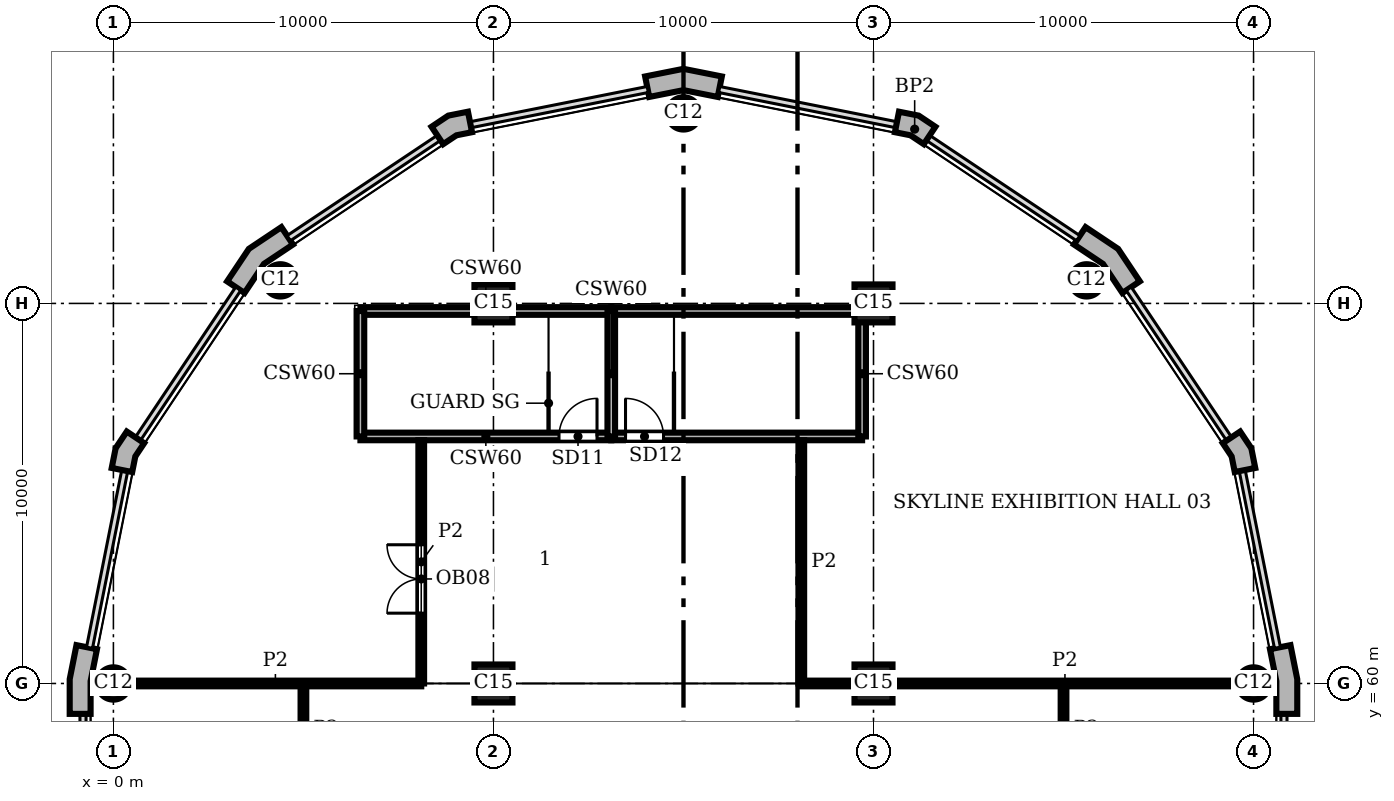
"""IFC4 building model, lengths in metres.
Left out: names, types, materials, properties, quantities, classifications, styles, units other than length and angle.
Written with IfcOpenShell. Run it as: python <this file> out.ifc"""

import sys

from ifc_helpers import new_model, si_unit, direction, frame, frame_2d, origin, origin_2d, place, context, subcontext, project, spatial, polyline, rectangle, circle, outline, extrude, element, fill, save


model = new_model("IFC4")
c1 = context("Model", 3, precision=1e-05, world=origin(), true_north=direction((0.0, 1.0)))
c2 = subcontext(c1, "Body", "Model", "MODEL_VIEW")
j1 = project(units=[si_unit("LENGTHUNIT", "METRE"), si_unit("PLANEANGLEUNIT", "RADIAN")], contexts=[c1])
p1 = place(None, origin())
s1 = spatial("IfcSite", under=j1, at=p1, CompositionType="ELEMENT")
p2 = place(p1, origin())
s2 = spatial("IfcBuilding", under=s1, at=p2, CompositionType="ELEMENT")
p3 = place(p2, frame((0.0, 0.0, 358.2)))
s3 = spatial("IfcBuildingStorey", under=s2, at=p3, CompositionType="ELEMENT", Elevation=358.2)
for number, where, z_axis, x_axis in (
    (1, (30.0, 60.0, 0.0), (0.0, 0.0, 1.0), (1.0, 0.0, 0.0)),
    (2, (25.607, 70.607, 0.0), (0.0, 0.0, 1.0), (1.0, 0.0, 0.0)),
    (3, (15.0, 75.0, 0.0), (0.0, 0.0, 1.0), (1.0, 0.0, 0.0)),
    (4, (4.393, 70.607, 0.0), (0.0, 0.0, 1.0), (1.0, 0.0, 0.0)),
    (5, (0.0, 60.0, 0.0), (0.0, 0.0, 1.0), (1.0, 0.0, 0.0)),
):
    element("IfcColumn", number, at=place(p3, frame(where, z_axis=z_axis, x_axis=x_axis)), inside=s3, PredefinedType="COLUMN", context=c2, shape_type="SweptSolid", body=[
        extrude(circle(Radius=0.425, at=origin_2d()), origin(), (0.0, 0.0, 1.0), 7.2),
    ])
for number, where, z_axis, x_axis in (
    (6, (10.0, 60.0, 0.0), (0.0, 0.0, 1.0), (1.0, 0.0, 0.0)),
    (7, (10.0, 70.0, 0.0), (0.0, 0.0, 1.0), (1.0, 0.0, 0.0)),
    (8, (20.0, 60.0, 0.0), (0.0, 0.0, 1.0), (1.0, 0.0, 0.0)),
    (9, (20.0, 70.0, 0.0), (0.0, 0.0, 1.0), (1.0, 0.0, 0.0)),
):
    element("IfcColumn", number, at=place(p3, frame(where, z_axis=z_axis, x_axis=x_axis)), inside=s3, PredefinedType="COLUMN", context=c2, shape_type="SweptSolid", body=[
        extrude(rectangle(XDim=1.0, YDim=1.0, at=origin_2d()), origin(), (0.0, 0.0, 1.0), 7.2),
    ])
p4 = place(p3, origin())
e10 = element("IfcWall", 10, at=p4, inside=s3, PredefinedType="SOLIDWALL", context=c2, shape_type="SweptSolid", body=[
    extrude(outline(polyline([(31.0, 59.2), (31.15, 59.2), (31.15, 60.113), (30.972, 61.009), (30.825, 60.98), (30.432, 60.902), (30.6, 60.059), (30.6, 59.2), (31.0, 59.2)])), origin(), (0.0, 0.0, 1.0), 7.2),
])
e11 = element("IfcWall", 11, at=p4, inside=s3, PredefinedType="SOLIDWALL", context=c2, shape_type="SweptSolid", body=[
    extrude(outline(polyline([(29.897, 65.641), (30.045, 65.67), (29.941, 66.189), (29.648, 66.629), (29.523, 66.545), (29.19, 66.323), (29.423, 65.974), (29.505, 65.563), (29.897, 65.641)])), origin(), (0.0, 0.0, 1.0), 7.2),
])
e12 = element("IfcWall", 12, at=p4, inside=s3, PredefinedType="SOLIDWALL", context=c2, shape_type="SweptSolid", body=[
    extrude(outline(polyline([(26.883, 70.497), (27.007, 70.58), (26.436, 71.436), (25.58, 72.007), (25.497, 71.883), (25.275, 71.55), (26.039, 71.039), (26.55, 70.275), (26.883, 70.497)])), origin(), (0.0, 0.0, 1.0), 7.2),
])
e13 = element("IfcWall", 13, at=p4, inside=s3, PredefinedType="SOLIDWALL", context=c2, shape_type="SweptSolid", body=[
    extrude(outline(polyline([(21.545, 74.523), (21.629, 74.648), (21.189, 74.941), (20.67, 75.045), (20.641, 74.897), (20.563, 74.505), (20.974, 74.423), (21.323, 74.19), (21.545, 74.523)])), origin(), (0.0, 0.0, 1.0), 7.2),
])
e14 = element("IfcWall", 14, at=p4, inside=s3, PredefinedType="SOLIDWALL", context=c2, shape_type="SweptSolid", body=[
    extrude(outline(polyline([(15.98, 75.825), (16.009, 75.972), (15.0, 76.173), (13.991, 75.972), (14.02, 75.825), (14.098, 75.432), (15.0, 75.612), (15.902, 75.432), (15.98, 75.825)])), origin(), (0.0, 0.0, 1.0), 7.2),
])
e15 = element("IfcWall", 15, at=p4, inside=s3, PredefinedType="SOLIDWALL", context=c2, shape_type="SweptSolid", body=[
    extrude(outline(polyline([(9.359, 74.897), (9.33, 75.045), (8.811, 74.941), (8.371, 74.648), (8.455, 74.523), (8.677, 74.19), (9.026, 74.423), (9.437, 74.505), (9.359, 74.897)])), origin(), (0.0, 0.0, 1.0), 7.2),
])
e16 = element("IfcWall", 16, at=p4, inside=s3, PredefinedType="SOLIDWALL", context=c2, shape_type="SweptSolid", body=[
    extrude(outline(polyline([(4.503, 71.883), (4.42, 72.007), (3.564, 71.436), (2.993, 70.58), (3.117, 70.497), (3.45, 70.275), (3.961, 71.039), (4.725, 71.55), (4.503, 71.883)])), origin(), (0.0, 0.0, 1.0), 7.2),
])
e17 = element("IfcWall", 17, at=p4, inside=s3, PredefinedType="SOLIDWALL", context=c2, shape_type="SweptSolid", body=[
    extrude(outline(polyline([(0.477, 66.545), (0.352, 66.629), (0.059, 66.189), (-0.045, 65.67), (0.103, 65.641), (0.495, 65.563), (0.577, 65.974), (0.81, 66.323), (0.477, 66.545)])), origin(), (0.0, 0.0, 1.0), 7.2),
])
e18 = element("IfcWall", 18, at=p4, inside=s3, PredefinedType="SOLIDWALL", context=c2, shape_type="SweptSolid", body=[
    extrude(outline(polyline([(-0.825, 60.98), (-0.972, 61.009), (-1.15, 60.113), (-1.15, 59.2), (-1.0, 59.2), (-0.6, 59.2), (-0.6, 60.059), (-0.432, 60.902), (-0.825, 60.98)])), origin(), (0.0, 0.0, 1.0), 7.2),
])
p5 = place(p3, frame((6.5, 66.5, 0.0), z_axis=(0.0, 0.0, 1.0), x_axis=(1.0, 0.0, 0.0)))
e19 = element("IfcWall", 19, at=p5, inside=s3, PredefinedType="SHEAR", context=c2, shape_type="SweptSolid", body=[
    extrude(rectangle(XDim=6.6, YDim=0.2, at=frame_2d((3.3, 0.0))), origin(), (0.0, 0.0, 1.0), 6.75),
])
p6 = place(p5, frame((5.225, 0.0, 0.0)))
e20 = element("IfcOpeningElement", 20, at=p6, cuts=e19, PredefinedType="OPENING", context=c2, shape_type="SweptSolid", body=[
    extrude(rectangle(XDim=1.0, YDim=2.1, at=frame_2d((0.5, 1.05))), frame((0.0, 0.11, 0.0), z_axis=(0.0, -1.0, 0.0), x_axis=(1.0, 0.0, 0.0)), (0.0, 0.0, 1.0), 0.22),
])
p7 = place(p3, frame((13.1, 66.5, 0.0), z_axis=(0.0, 0.0, 1.0), x_axis=(1.0, 0.0, 0.0)))
e21 = element("IfcWall", 21, at=p7, inside=s3, PredefinedType="SHEAR", context=c2, shape_type="SweptSolid", body=[
    extrude(rectangle(XDim=6.6, YDim=0.2, at=frame_2d((3.3, 0.0))), origin(), (0.0, 0.0, 1.0), 6.75),
])
p8 = place(p7, frame((0.375, 0.0, 0.0)))
e22 = element("IfcOpeningElement", 22, at=p8, cuts=e21, PredefinedType="OPENING", context=c2, shape_type="SweptSolid", body=[
    extrude(rectangle(XDim=1.0, YDim=2.1, at=frame_2d((0.5, 1.05))), frame((0.0, 0.11, 0.0), z_axis=(0.0, -1.0, 0.0), x_axis=(1.0, 0.0, 0.0)), (0.0, 0.0, 1.0), 0.22),
])
p9 = place(p3, frame((6.5, 69.8, 0.0), z_axis=(0.0, 0.0, 1.0), x_axis=(1.0, 0.0, 0.0)))
e23 = element("IfcWall", 23, at=p9, inside=s3, PredefinedType="SHEAR", context=c2, shape_type="SweptSolid", body=[
    extrude(rectangle(XDim=6.6, YDim=0.2, at=frame_2d((3.3, 0.0))), origin(), (0.0, 0.0, 1.0), 6.75),
])
p10 = place(p3, frame((13.1, 69.8, 0.0), z_axis=(0.0, 0.0, 1.0), x_axis=(1.0, 0.0, 0.0)))
e24 = element("IfcWall", 24, at=p10, inside=s3, PredefinedType="SHEAR", context=c2, shape_type="SweptSolid", body=[
    extrude(rectangle(XDim=6.6, YDim=0.2, at=frame_2d((3.3, 0.0))), origin(), (0.0, 0.0, 1.0), 6.75),
])
for number, where, z_axis, x_axis in (
    (25, (6.5, 66.5, 0.0), (0.0, 0.0, 1.0), (0.0, 1.0, 0.0)),
    (26, (13.1, 66.5, 0.0), (0.0, 0.0, 1.0), (0.0, 1.0, 0.0)),
    (27, (19.7, 66.5, 0.0), (0.0, 0.0, 1.0), (0.0, 1.0, 0.0)),
):
    element("IfcWall", number, at=place(p3, frame(where, z_axis=z_axis, x_axis=x_axis)), inside=s3, PredefinedType="SHEAR", context=c2, shape_type="SweptSolid", body=[
        extrude(rectangle(XDim=3.3, YDim=0.2, at=frame_2d((1.65, 0.0))), origin(), (0.0, 0.0, 1.0), 6.75),
    ])
p11 = place(p3, frame((5.0, 57.6, 0.0), z_axis=(0.0, 0.0, 1.0), x_axis=(0.0, 1.0, 0.0)))
e28 = element("IfcWall", 28, at=p11, inside=s3, PredefinedType="PARTITIONING", context=c2, shape_type="SweptSolid", body=[
    extrude(rectangle(XDim=2.4, YDim=0.15, at=frame_2d((1.2, 0.0))), origin(), (0.0, 0.0, 1.0), 6.75),
])
p12 = place(p3, frame((8.1, 60.0, 0.0), z_axis=(0.0, 0.0, 1.0), x_axis=(0.0, 1.0, 0.0)))
e29 = element("IfcWall", 29, at=p12, inside=s3, PredefinedType="PARTITIONING", context=c2, shape_type="SweptSolid", body=[
    extrude(rectangle(XDim=6.4, YDim=0.15, at=frame_2d((3.2, 0.0))), origin(), (0.0, 0.0, 1.0), 6.75),
])
p13 = place(p12, frame((1.85, 0.0, 0.0)))
e30 = element("IfcOpeningElement", 30, at=p13, cuts=e29, PredefinedType="OPENING", context=c2, shape_type="SweptSolid", body=[
    extrude(rectangle(XDim=1.8, YDim=2.1, at=frame_2d((0.9, 1.05))), frame((0.0, 0.085, 0.0), z_axis=(0.0, -1.0, 0.0), x_axis=(1.0, 0.0, 0.0)), (0.0, 0.0, 1.0), 0.17),
])
p14 = place(p3, frame((18.1, 60.0, 0.0), z_axis=(0.0, 0.0, 1.0), x_axis=(0.0, 1.0, 0.0)))
e31 = element("IfcWall", 31, at=p14, inside=s3, PredefinedType="PARTITIONING", context=c2, shape_type="SweptSolid", body=[
    extrude(rectangle(XDim=6.4, YDim=0.15, at=frame_2d((3.2, 0.0))), origin(), (0.0, 0.0, 1.0), 6.75),
])
p15 = place(p3, frame((25.0, 57.6, 0.0), z_axis=(0.0, 0.0, 1.0), x_axis=(0.0, 1.0, 0.0)))
e32 = element("IfcWall", 32, at=p15, inside=s3, PredefinedType="PARTITIONING", context=c2, shape_type="SweptSolid", body=[
    extrude(rectangle(XDim=2.4, YDim=0.15, at=frame_2d((1.2, 0.0))), origin(), (0.0, 0.0, 1.0), 6.75),
])
p16 = place(p3, frame((0.425, 60.0, 0.0), z_axis=(0.0, 0.0, 1.0), x_axis=(1.0, 0.0, 0.0)))
e33 = element("IfcWall", 33, at=p16, inside=s3, PredefinedType="PARTITIONING", context=c2, shape_type="SweptSolid", body=[
    extrude(rectangle(XDim=7.675, YDim=0.15, at=frame_2d((3.837, 0.0))), origin(), (0.0, 0.0, 1.0), 6.75),
])
p17 = place(p3, frame((18.1, 60.0, 0.0), z_axis=(0.0, 0.0, 1.0), x_axis=(1.0, 0.0, 0.0)))
e34 = element("IfcWall", 34, at=p17, inside=s3, PredefinedType="PARTITIONING", context=c2, shape_type="SweptSolid", body=[
    extrude(rectangle(XDim=1.4, YDim=0.15, at=frame_2d((0.7, 0.0))), origin(), (0.0, 0.0, 1.0), 6.75),
])
p18 = place(p3, frame((20.5, 60.0, 0.0), z_axis=(0.0, 0.0, 1.0), x_axis=(1.0, 0.0, 0.0)))
e35 = element("IfcWall", 35, at=p18, inside=s3, PredefinedType="PARTITIONING", context=c2, shape_type="SweptSolid", body=[
    extrude(rectangle(XDim=9.075, YDim=0.15, at=frame_2d((4.538, 0.0))), origin(), (0.0, 0.0, 1.0), 6.75),
])
p19 = place(p6, origin())
e36 = element("IfcDoor", 36, at=p19, inside=s3, OperationType="SINGLE_SWING_RIGHT", PredefinedType="DOOR", context=c2, shape_type="SweptSolid", body=[
    extrude(rectangle(XDim=1.0, YDim=2.1, at=frame_2d((0.5, 1.05))), frame((0.0, 0.025, 0.0), z_axis=(0.0, -1.0, 0.0), x_axis=(1.0, 0.0, 0.0)), (0.0, 0.0, 1.0), 0.05),
])
fill(e20, e36)
p20 = place(p8, origin())
e37 = element("IfcDoor", 37, at=p20, inside=s3, OperationType="SINGLE_SWING_LEFT", PredefinedType="DOOR", context=c2, shape_type="SweptSolid", body=[
    extrude(rectangle(XDim=1.0, YDim=2.1, at=frame_2d((0.5, 1.05))), frame((0.0, 0.025, 0.0), z_axis=(0.0, -1.0, 0.0), x_axis=(1.0, 0.0, 0.0)), (0.0, 0.0, 1.0), 0.05),
])
fill(e22, e37)
p21 = place(p13, origin())
e38 = element("IfcDoor", 38, at=p21, inside=s3, OperationType="DOUBLE_DOOR_SINGLE_SWING", PredefinedType="DOOR", context=c2, shape_type="SweptSolid", body=[
    extrude(rectangle(XDim=1.8, YDim=2.1, at=frame_2d((0.9, 1.05))), frame((0.0, 0.025, 0.0), z_axis=(0.0, -1.0, 0.0), x_axis=(1.0, 0.0, 0.0)), (0.0, 0.0, 1.0), 0.05),
])
fill(e30, e38)
save(model, sys.argv[1])
